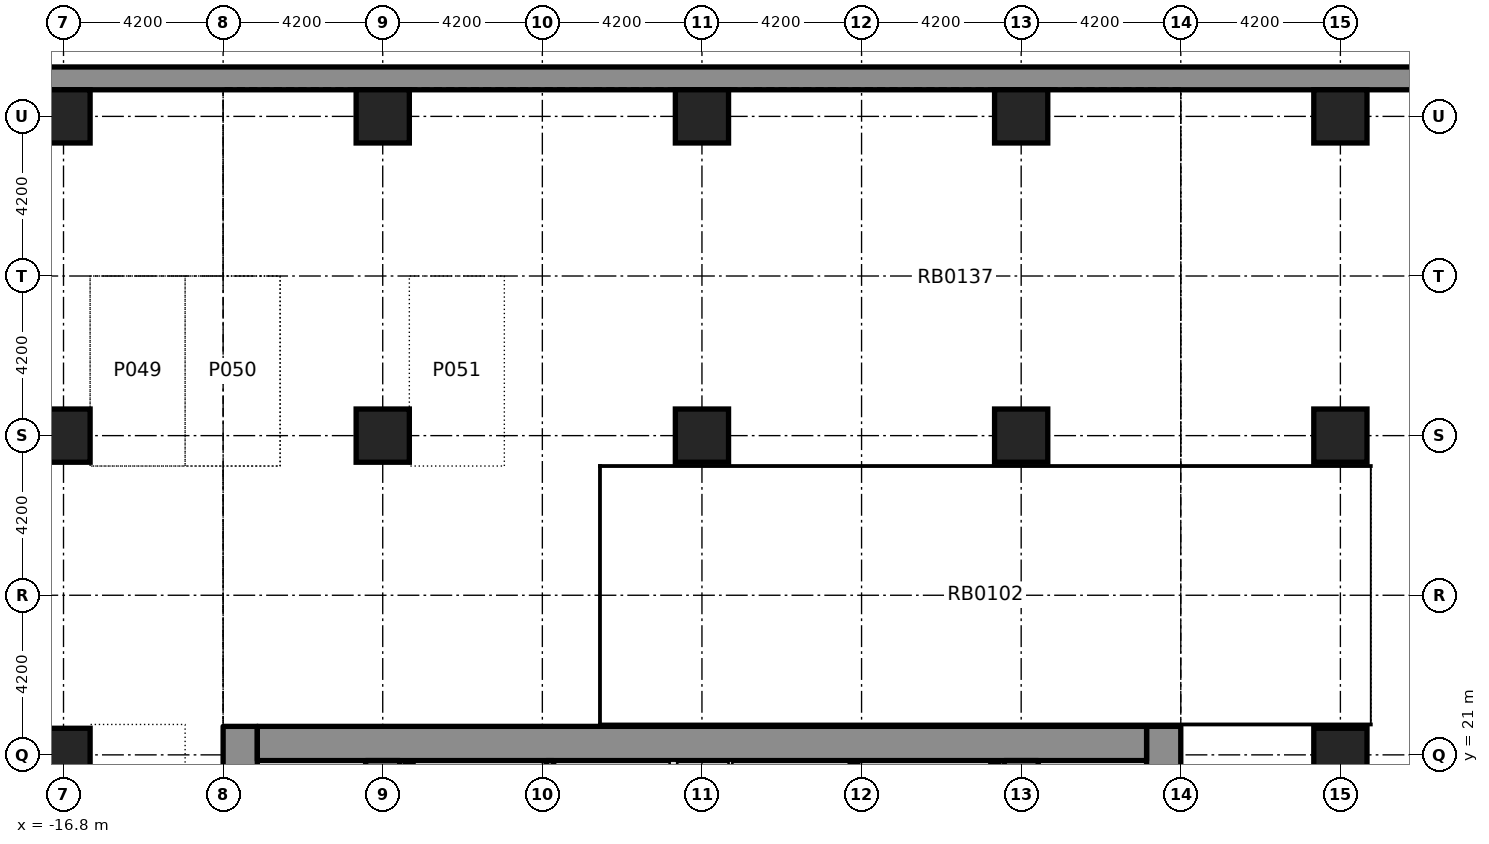
"""IFC4 building model, lengths in metres.
Left out: names, types, materials, properties, quantities, classifications, styles, units other than length and angle.
Written with IfcOpenShell. Run it as: python <this file> out.ifc"""

import sys

from ifc_helpers import new_model, si_unit, direction, frame, frame_2d, origin, origin_2d, place, context, subcontext, project, spatial, rectangle, extrude, element, save


model = new_model("IFC4")
c1 = context("Model", 3, precision=1e-05, world=origin(), true_north=direction((0.0, 1.0)))
c2 = subcontext(c1, "Body", "Model", "MODEL_VIEW")
j1 = project(units=[si_unit("LENGTHUNIT", "METRE"), si_unit("PLANEANGLEUNIT", "RADIAN")], contexts=[c1])
p1 = place(None, origin())
s1 = spatial("IfcSite", under=j1, at=p1, CompositionType="ELEMENT")
p2 = place(p1, origin())
s2 = spatial("IfcBuilding", under=s1, at=p2, CompositionType="ELEMENT")
p3 = place(p2, frame((0.0, 0.0, -4.2)))
s3 = spatial("IfcBuildingStorey", under=s2, at=p3, CompositionType="ELEMENT", Elevation=-4.2)
p4 = place(p3, frame((12.15, -8.4, -0.35), z_axis=(0.0, 0.0, 1.0), x_axis=(0.0, 1.0, 0.0)))
e1 = element("IfcWall", 1, at=p4, inside=s3, PredefinedType="SHEAR", context=c2, shape_type="SweptSolid", body=[
    extrude(rectangle(XDim=30.15, YDim=0.9, at=frame_2d((15.075, 0.0))), origin(), (0.0, 0.0, 1.0), 4.1),
])
p5 = place(p4, frame((3.925, 0.0, 0.35)))
e2 = element("IfcOpeningElement", 2, at=p5, cuts=e1, PredefinedType="OPENING", context=c2, shape_type="SweptSolid", body=[
    extrude(rectangle(XDim=0.95, YDim=2.1, at=frame_2d((0.475, 1.05))), frame((0.0, 0.46, 0.0), z_axis=(0.0, -1.0, 0.0), x_axis=(1.0, 0.0, 0.0)), (0.0, 0.0, 1.0), 0.92),
])
p6 = place(p4, frame((9.175, 0.0, 0.35)))
e3 = element("IfcOpeningElement", 3, at=p6, cuts=e1, PredefinedType="OPENING", context=c2, shape_type="SweptSolid", body=[
    extrude(rectangle(XDim=0.95, YDim=2.1, at=frame_2d((0.475, 1.05))), frame((0.0, 0.46, 0.0), z_axis=(0.0, -1.0, 0.0), x_axis=(1.0, 0.0, 0.0)), (0.0, 0.0, 1.0), 0.92),
])
p7 = place(p4, frame((14.525, 0.0, 0.35)))
e4 = element("IfcOpeningElement", 4, at=p7, cuts=e1, PredefinedType="OPENING", context=c2, shape_type="SweptSolid", body=[
    extrude(rectangle(XDim=0.95, YDim=2.1, at=frame_2d((0.475, 1.05))), frame((0.0, 0.46, 0.0), z_axis=(0.0, -1.0, 0.0), x_axis=(1.0, 0.0, 0.0)), (0.0, 0.0, 1.0), 0.92),
])
p8 = place(p4, frame((22.225, 0.0, 0.35)))
e5 = element("IfcOpeningElement", 5, at=p8, cuts=e1, PredefinedType="OPENING", context=c2, shape_type="SweptSolid", body=[
    extrude(rectangle(XDim=0.95, YDim=2.1, at=frame_2d((0.475, 1.05))), frame((0.0, 0.46, 0.0), z_axis=(0.0, -1.0, 0.0), x_axis=(1.0, 0.0, 0.0)), (0.0, 0.0, 1.0), 0.92),
])
p9 = place(p4, frame((26.25, 0.0, 0.35)))
e6 = element("IfcOpeningElement", 6, at=p9, cuts=e1, PredefinedType="OPENING", context=c2, shape_type="SweptSolid", body=[
    extrude(rectangle(XDim=0.95, YDim=2.1, at=frame_2d((0.475, 1.05))), frame((0.0, 0.46, 0.0), z_axis=(0.0, -1.0, 0.0), x_axis=(1.0, 0.0, 0.0)), (0.0, 0.0, 1.0), 0.92),
])
p10 = place(p4, frame((19.3, 0.0, 0.35)))
e7 = element("IfcOpeningElement", 7, at=p10, cuts=e1, PredefinedType="OPENING", context=c2, shape_type="SweptSolid", body=[
    extrude(rectangle(XDim=1.2, YDim=2.1, at=frame_2d((0.6, 1.05))), frame((0.0, 0.46, 0.0), z_axis=(0.0, -1.0, 0.0), x_axis=(1.0, 0.0, 0.0)), (0.0, 0.0, 1.0), 0.92),
])
p11 = place(p3, frame((-12.15, -8.4, -0.35), z_axis=(0.0, 0.0, 1.0), x_axis=(0.0, 1.0, 0.0)))
e8 = element("IfcWall", 8, at=p11, inside=s3, PredefinedType="SHEAR", context=c2, shape_type="SweptSolid", body=[
    extrude(rectangle(XDim=30.15, YDim=0.9, at=frame_2d((15.075, 0.0))), origin(), (0.0, 0.0, 1.0), 4.1),
])
p12 = place(p11, frame((3.425, 0.0, 0.35)))
e9 = element("IfcOpeningElement", 9, at=p12, cuts=e8, PredefinedType="OPENING", context=c2, shape_type="SweptSolid", body=[
    extrude(rectangle(XDim=0.95, YDim=2.1, at=frame_2d((0.475, 1.05))), frame((0.0, 0.46, 0.0), z_axis=(0.0, -1.0, 0.0), x_axis=(1.0, 0.0, 0.0)), (0.0, 0.0, 1.0), 0.92),
])
p13 = place(p11, frame((8.075, 0.0, 0.35)))
e10 = element("IfcOpeningElement", 10, at=p13, cuts=e8, PredefinedType="OPENING", context=c2, shape_type="SweptSolid", body=[
    extrude(rectangle(XDim=0.95, YDim=2.1, at=frame_2d((0.475, 1.05))), frame((0.0, 0.46, 0.0), z_axis=(0.0, -1.0, 0.0), x_axis=(1.0, 0.0, 0.0)), (0.0, 0.0, 1.0), 0.92),
])
p14 = place(p11, frame((11.425, 0.0, 0.35)))
e11 = element("IfcOpeningElement", 11, at=p14, cuts=e8, PredefinedType="OPENING", context=c2, shape_type="SweptSolid", body=[
    extrude(rectangle(XDim=0.95, YDim=2.1, at=frame_2d((0.475, 1.05))), frame((0.0, 0.46, 0.0), z_axis=(0.0, -1.0, 0.0), x_axis=(1.0, 0.0, 0.0)), (0.0, 0.0, 1.0), 0.92),
])
p15 = place(p11, frame((15.625, 0.0, 0.35)))
e12 = element("IfcOpeningElement", 12, at=p15, cuts=e8, PredefinedType="OPENING", context=c2, shape_type="SweptSolid", body=[
    extrude(rectangle(XDim=0.95, YDim=2.1, at=frame_2d((0.475, 1.05))), frame((0.0, 0.46, 0.0), z_axis=(0.0, -1.0, 0.0), x_axis=(1.0, 0.0, 0.0)), (0.0, 0.0, 1.0), 0.92),
])
p16 = place(p11, frame((22.725, 0.0, 0.35)))
e13 = element("IfcOpeningElement", 13, at=p16, cuts=e8, PredefinedType="OPENING", context=c2, shape_type="SweptSolid", body=[
    extrude(rectangle(XDim=0.95, YDim=2.1, at=frame_2d((0.475, 1.05))), frame((0.0, 0.46, 0.0), z_axis=(0.0, -1.0, 0.0), x_axis=(1.0, 0.0, 0.0)), (0.0, 0.0, 1.0), 0.92),
])
p17 = place(p11, frame((26.75, 0.0, 0.35)))
e14 = element("IfcOpeningElement", 14, at=p17, cuts=e8, PredefinedType="OPENING", context=c2, shape_type="SweptSolid", body=[
    extrude(rectangle(XDim=0.95, YDim=2.1, at=frame_2d((0.475, 1.05))), frame((0.0, 0.46, 0.0), z_axis=(0.0, -1.0, 0.0), x_axis=(1.0, 0.0, 0.0)), (0.0, 0.0, 1.0), 0.92),
])
p18 = place(p11, frame((19.3, 0.0, 0.35)))
e15 = element("IfcOpeningElement", 15, at=p18, cuts=e8, PredefinedType="OPENING", context=c2, shape_type="SweptSolid", body=[
    extrude(rectangle(XDim=1.2, YDim=2.1, at=frame_2d((0.6, 1.05))), frame((0.0, 0.46, 0.0), z_axis=(0.0, -1.0, 0.0), x_axis=(1.0, 0.0, 0.0)), (0.0, 0.0, 1.0), 0.92),
])
p19 = place(p3, frame((-11.7, 21.3, -0.35), z_axis=(0.0, 0.0, 1.0), x_axis=(1.0, 0.0, 0.0)))
e16 = element("IfcWall", 16, at=p19, inside=s3, PredefinedType="SOLIDWALL", context=c2, shape_type="SweptSolid", body=[
    extrude(rectangle(XDim=23.4, YDim=0.9, at=frame_2d((11.7, 0.0))), origin(), (0.0, 0.0, 1.0), 4.1),
])
p20 = place(p3, frame((-8.4, -7.5, -0.35), z_axis=(0.0, 0.0, 1.0), x_axis=(0.0, 1.0, 0.0)))
e17 = element("IfcWall", 17, at=p20, inside=s3, PredefinedType="SHEAR", context=c2, shape_type="SweptSolid", body=[
    extrude(rectangle(XDim=28.35, YDim=0.9, at=frame_2d((14.175, 0.0))), origin(), (0.0, 0.0, 1.0), 4.1),
])
p21 = place(p20, frame((18.4, 0.0, 0.35)))
e18 = element("IfcOpeningElement", 18, at=p21, cuts=e17, PredefinedType="OPENING", context=c2, shape_type="SweptSolid", body=[
    extrude(rectangle(XDim=1.2, YDim=2.1, at=frame_2d((0.6, 1.05))), frame((0.0, 0.46, 0.0), z_axis=(0.0, -1.0, 0.0), x_axis=(1.0, 0.0, 0.0)), (0.0, 0.0, 1.0), 0.92),
])
p22 = place(p3, frame((8.4, -7.5, -0.35), z_axis=(0.0, 0.0, 1.0), x_axis=(0.0, 1.0, 0.0)))
e19 = element("IfcWall", 19, at=p22, inside=s3, PredefinedType="SHEAR", context=c2, shape_type="SweptSolid", body=[
    extrude(rectangle(XDim=28.35, YDim=0.9, at=frame_2d((14.175, 0.0))), origin(), (0.0, 0.0, 1.0), 4.1),
])
p23 = place(p22, frame((18.4, 0.0, 0.35)))
e20 = element("IfcOpeningElement", 20, at=p23, cuts=e19, PredefinedType="OPENING", context=c2, shape_type="SweptSolid", body=[
    extrude(rectangle(XDim=1.2, YDim=2.1, at=frame_2d((0.6, 1.05))), frame((0.0, 0.46, 0.0), z_axis=(0.0, -1.0, 0.0), x_axis=(1.0, 0.0, 0.0)), (0.0, 0.0, 1.0), 0.92),
])
for number, where, z_axis, x_axis in (
    (21, (-16.8, 21.0, -0.35), (0.0, 0.0, 1.0), (1.0, 0.0, 0.0)),
    (22, (16.8, 21.0, -0.35), (0.0, 0.0, 1.0), (1.0, 0.0, 0.0)),
):
    element("IfcColumn", number, at=place(p3, frame(where, z_axis=z_axis, x_axis=x_axis)), inside=s3, PredefinedType="COLUMN", context=c2, shape_type="SweptSolid", body=[
        extrude(rectangle(XDim=1.4, YDim=1.4, at=origin_2d()), origin(), (0.0, 0.0, 1.0), 4.1),
    ])
p24 = place(p3, frame((-43.3, 38.8, 0.0), z_axis=(0.0, 0.0, 1.0), x_axis=(1.0, 0.0, 0.0)))
e23 = element("IfcWall", 23, at=p24, inside=s3, PredefinedType="SOLIDWALL", context=c2, shape_type="SweptSolid", body=[
    extrude(rectangle(XDim=103.4, YDim=0.6, at=frame_2d((51.7, 0.0))), origin(), (0.0, 0.0, 1.0), 4.2),
])
for number, where, z_axis, x_axis in (
    (24, (-16.8, 29.4, 0.0), (0.0, 0.0, 1.0), (1.0, 0.0, 0.0)),
    (25, (-8.4, 29.4, 0.0), (0.0, 0.0, 1.0), (1.0, 0.0, 0.0)),
    (26, (0.0, 29.4, 0.0), (0.0, 0.0, 1.0), (1.0, 0.0, 0.0)),
    (27, (8.4, 29.4, 0.0), (0.0, 0.0, 1.0), (1.0, 0.0, 0.0)),
    (28, (16.8, 29.4, 0.0), (0.0, 0.0, 1.0), (1.0, 0.0, 0.0)),
):
    element("IfcColumn", number, at=place(p3, frame(where, z_axis=z_axis, x_axis=x_axis)), inside=s3, PredefinedType="COLUMN", context=c2, shape_type="SweptSolid", body=[
        extrude(rectangle(XDim=1.4, YDim=1.4, at=origin_2d()), origin(), (0.0, 0.0, 1.0), 4.2),
    ])
for number, where, z_axis, x_axis in (
    (29, (-16.8, 37.8, 0.0), (0.0, 0.0, 1.0), (1.0, 0.0, 0.0)),
    (30, (-8.4, 37.8, 0.0), (0.0, 0.0, 1.0), (1.0, 0.0, 0.0)),
    (31, (0.0, 37.8, 0.0), (0.0, 0.0, 1.0), (1.0, 0.0, 0.0)),
    (32, (8.4, 37.8, 0.0), (0.0, 0.0, 1.0), (1.0, 0.0, 0.0)),
    (33, (16.8, 37.8, 0.0), (0.0, 0.0, 1.0), (1.0, 0.0, 0.0)),
):
    element("IfcColumn", number, at=place(p3, frame(where, z_axis=z_axis, x_axis=x_axis)), inside=s3, PredefinedType="COLUMN", context=c2, shape_type="SweptSolid", body=[
        extrude(rectangle(XDim=1.4, YDim=1.4, at=origin_2d()), origin(), (0.0, 0.0, 1.0), 3.75),
    ])
p25 = place(p3, frame((-4.0, 13.35, 0.0), z_axis=(0.0, 0.0, 1.0), x_axis=(0.0, 1.0, 0.0)))
e34 = element("IfcWall", 34, at=p25, inside=s3, PredefinedType="SOLIDWALL", context=c2, shape_type="SweptSolid", body=[
    extrude(rectangle(XDim=7.499, YDim=0.2, at=frame_2d((3.75, 0.0))), origin(), (0.0, 0.0, 1.0), 3.75),
])
p26 = place(p3, frame((-0.75, 13.325, 0.0), z_axis=(0.0, 0.0, 1.0), x_axis=(0.0, 1.0, 0.0)))
e35 = element("IfcWall", 35, at=p26, inside=s3, PredefinedType="PARTITIONING", context=c2, shape_type="SweptSolid", body=[
    extrude(rectangle(XDim=7.524, YDim=0.2, at=frame_2d((3.762, 0.0))), origin(), (0.0, 0.0, 1.0), 3.75),
])
p27 = place(p26, frame((4.8, 0.0, 0.0)))
e36 = element("IfcOpeningElement", 36, at=p27, cuts=e35, PredefinedType="OPENING", context=c2, shape_type="SweptSolid", body=[
    extrude(rectangle(XDim=0.95, YDim=2.1, at=frame_2d((0.475, 1.05))), frame((0.0, 0.11, 0.0), z_axis=(0.0, -1.0, 0.0), x_axis=(1.0, 0.0, 0.0)), (0.0, 0.0, 1.0), 0.22),
])
p28 = place(p3, frame((0.75, 16.05, 0.0), z_axis=(0.0, 0.0, 1.0), x_axis=(0.0, 1.0, 0.0)))
e37 = element("IfcWall", 37, at=p28, inside=s3, PredefinedType="PARTITIONING", context=c2, shape_type="SweptSolid", body=[
    extrude(rectangle(XDim=4.799, YDim=0.1, at=frame_2d((2.399, 0.0))), origin(), (0.0, 0.0, 1.0), 3.75),
])
p29 = place(p28, frame((1.875, 0.0, 0.0)))
e38 = element("IfcOpeningElement", 38, at=p29, cuts=e37, PredefinedType="OPENING", context=c2, shape_type="SweptSolid", body=[
    extrude(rectangle(XDim=0.95, YDim=2.1, at=frame_2d((0.475, 1.05))), frame((0.0, 0.06, 0.0), z_axis=(0.0, -1.0, 0.0), x_axis=(1.0, 0.0, 0.0)), (0.0, 0.0, 1.0), 0.12),
])
p30 = place(p3, frame((3.95, 16.05, 0.0), z_axis=(0.0, 0.0, 1.0), x_axis=(0.010538176883, 0.999944471872, 0.0)))
e39 = element("IfcWall", 39, at=p30, inside=s3, PredefinedType="SOLIDWALL", context=c2, shape_type="SweptSolid", body=[
    extrude(rectangle(XDim=4.749, YDim=0.2, at=frame_2d((2.375, 0.0))), origin(), (0.0, 0.0, 1.0), 3.75),
])
for number, where, z_axis, x_axis in (
    (40, (-7.7, 13.4, 0.0), (0.0, 0.0, 1.0), (0.0, 1.0, 0.0)),
    (41, (7.7, 13.4, 0.0), (0.0, 0.0, 1.0), (0.0, 1.0, 0.0)),
):
    element("IfcWall", number, at=place(p3, frame(where, z_axis=z_axis, x_axis=x_axis)), inside=s3, PredefinedType="SOLIDWALL", context=c2, shape_type="SweptSolid", body=[
        extrude(rectangle(XDim=7.4, YDim=0.2, at=frame_2d((3.7, 0.0))), origin(), (0.0, 0.0, 1.0), 3.75),
    ])
save(model, sys.argv[1])
